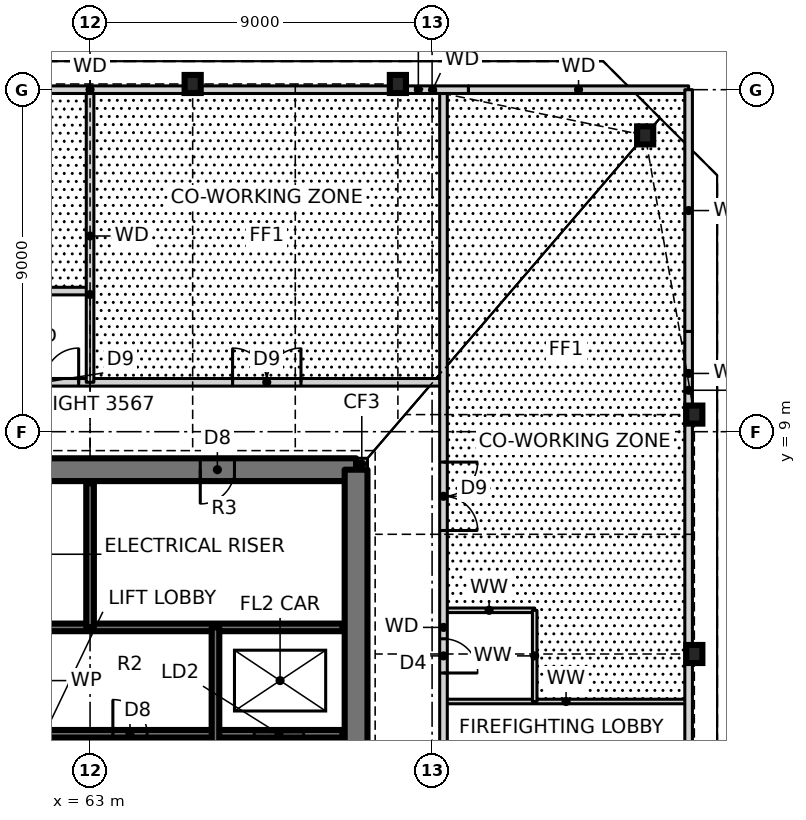
"""IFC4 building model, lengths in metres.
Left out: names, types, materials, properties, quantities, classifications, styles, units other than length and angle.
Written with IfcOpenShell. Run it as: python <this file> out.ifc"""

import sys

from ifc_helpers import new_model, si_unit, direction, frame, frame_2d, origin, origin_2d, place, context, subcontext, project, spatial, rectangle, i_section, extrude, element, fill, save


model = new_model("IFC4")
c1 = context("Model", 3, precision=1e-05, world=origin(), true_north=direction((0.0, 1.0)))
c2 = subcontext(c1, "Body", "Model", "MODEL_VIEW")
j1 = project(units=[si_unit("LENGTHUNIT", "METRE"), si_unit("PLANEANGLEUNIT", "RADIAN")], contexts=[c1])
p1 = place(None, origin())
s1 = spatial("IfcSite", under=j1, at=p1, CompositionType="ELEMENT")
p2 = place(p1, origin())
s2 = spatial("IfcBuilding", under=s1, at=p2, CompositionType="ELEMENT")
p3 = place(p2, frame((0.0, 0.0, 6.0)))
s3 = spatial("IfcBuildingStorey", under=s2, at=p3, CompositionType="ELEMENT", Elevation=6.0)
for number, where, z_axis, x_axis in (
    (1, (78.9, 3.15, 0.0), (0.0, 0.0, 1.0), (1.0, 0.0, 0.0)),
    (2, (78.9, 9.45, 0.0), (0.0, 0.0, 1.0), (1.0, 0.0, 0.0)),
    (3, (77.606, 16.797, 0.0), (0.0, 0.0, 1.0), (1.0, 0.0, 0.0)),
    (4, (71.1, 18.15, 0.0), (0.0, 0.0, 1.0), (1.0, 0.0, 0.0)),
    (5, (65.7, 18.15, 0.0), (0.0, 0.0, 1.0), (1.0, 0.0, 0.0)),
):
    element("IfcColumn", number, at=place(p3, frame(where, z_axis=z_axis, x_axis=x_axis)), inside=s3, PredefinedType="COLUMN", context=c2, shape_type="SweptSolid", body=[
        extrude(i_section(OverallWidth=0.424, OverallDepth=0.475, WebThickness=0.048, FlangeThickness=0.077, at=origin_2d()), origin(), (0.0, 0.0, 1.0), 4.5),
    ])
p4 = place(p3, frame((70.0, 8.15, 0.0), z_axis=(0.0, 0.0, 1.0), x_axis=(1.0, 0.0, 0.0)))
e6 = element("IfcWall", 6, at=p4, inside=s3, PredefinedType="SOLIDWALL", context=c2, shape_type="SweptSolid", body=[
    extrude(rectangle(XDim=0.3, YDim=0.3, at=frame_2d((0.15, 0.0))), origin(), (0.0, 0.0, 1.0), 4.5),
])
p5 = place(p3, frame((70.0, 8.0, 0.0), z_axis=(0.0, 0.0, 1.0), x_axis=(-1.0, 0.0, 0.0)))
e7 = element("IfcWall", 7, at=p5, inside=s3, PredefinedType="SHEAR", context=c2, shape_type="SweptSolid", body=[
    extrude(rectangle(XDim=14.0, YDim=0.6, at=frame_2d((7.0, 0.0))), origin(), (0.0, 0.0, 1.0), 4.5),
])
p6 = place(p5, frame((8.2, 0.0, 0.0)))
e8 = element("IfcOpeningElement", 8, at=p6, cuts=e7, PredefinedType="OPENING", context=c2, shape_type="SweptSolid", body=[
    extrude(rectangle(XDim=0.9, YDim=2.1, at=frame_2d((0.45, 1.05))), frame((0.0, 0.31, 0.0), z_axis=(0.0, -1.0, 0.0), x_axis=(1.0, 0.0, 0.0)), (0.0, 0.0, 1.0), 0.62),
])
p7 = place(p5, frame((3.2, 0.0, 0.0)))
e9 = element("IfcOpeningElement", 9, at=p7, cuts=e7, PredefinedType="OPENING", context=c2, shape_type="SweptSolid", body=[
    extrude(rectangle(XDim=0.9, YDim=2.1, at=frame_2d((0.45, 1.05))), frame((0.0, 0.31, 0.0), z_axis=(0.0, -1.0, 0.0), x_axis=(1.0, 0.0, 0.0)), (0.0, 0.0, 1.0), 0.62),
])
p8 = place(p3, frame((70.0, -8.0, 0.0), z_axis=(0.0, 0.0, 1.0), x_axis=(0.0, 1.0, 0.0)))
e10 = element("IfcWall", 10, at=p8, inside=s3, PredefinedType="SHEAR", context=c2, shape_type="SweptSolid", body=[
    extrude(rectangle(XDim=16.0, YDim=0.6, at=frame_2d((8.0, 0.0))), origin(), (0.0, 0.0, 1.0), 4.5),
])
p9 = place(p8, frame((7.5, 0.0, 0.0)))
e11 = element("IfcOpeningElement", 11, at=p9, cuts=e10, PredefinedType="OPENING", context=c2, shape_type="SweptSolid", body=[
    extrude(rectangle(XDim=1.0, YDim=2.1, at=frame_2d((0.5, 1.05))), frame((0.0, 0.31, 0.0), z_axis=(0.0, -1.0, 0.0), x_axis=(1.0, 0.0, 0.0)), (0.0, 0.0, 1.0), 0.62),
])
p10 = place(p3, frame((56.36, 1.05, 0.0), z_axis=(0.0, 0.0, 1.0), x_axis=(1.0, 0.0, 0.0)))
e12 = element("IfcWall", 12, at=p10, inside=s3, PredefinedType="SOLIDWALL", context=c2, shape_type="SweptSolid", body=[
    extrude(rectangle(XDim=13.28, YDim=0.2, at=frame_2d((6.64, 0.0))), origin(), (0.0, 0.0, 1.0), 4.5),
])
p11 = place(p10, frame((1.17, 0.0, 0.0)))
e13 = element("IfcOpeningElement", 13, at=p11, cuts=e12, PredefinedType="OPENING", context=c2, shape_type="SweptSolid", body=[
    extrude(rectangle(XDim=1.0, YDim=2.1, at=frame_2d((0.5, 1.05))), frame((0.0, 0.11, 0.0), z_axis=(0.0, -1.0, 0.0), x_axis=(1.0, 0.0, 0.0)), (0.0, 0.0, 1.0), 0.22),
])
p12 = place(p10, frame((7.24, 0.0, 0.0)))
e14 = element("IfcOpeningElement", 14, at=p12, cuts=e12, PredefinedType="OPENING", context=c2, shape_type="SweptSolid", body=[
    extrude(rectangle(XDim=0.9, YDim=2.1, at=frame_2d((0.45, 1.05))), frame((0.0, 0.11, 0.0), z_axis=(0.0, -1.0, 0.0), x_axis=(1.0, 0.0, 0.0)), (0.0, 0.0, 1.0), 0.22),
])
p13 = place(p10, frame((3.94, 0.0, 0.0)))
e15 = element("IfcOpeningElement", 15, at=p13, cuts=e12, PredefinedType="OPENING", context=c2, shape_type="SweptSolid", body=[
    extrude(rectangle(XDim=0.9, YDim=2.1, at=frame_2d((0.45, 1.05))), frame((0.0, 0.11, 0.0), z_axis=(0.0, -1.0, 0.0), x_axis=(1.0, 0.0, 0.0)), (0.0, 0.0, 1.0), 0.22),
])
p14 = place(p10, frame((10.96, 0.0, 0.0)))
e16 = element("IfcOpeningElement", 16, at=p14, cuts=e12, PredefinedType="OPENING", context=c2, shape_type="SweptSolid", body=[
    extrude(rectangle(XDim=1.3, YDim=2.1, at=frame_2d((0.65, 1.05))), frame((0.0, 0.11, 0.0), z_axis=(0.0, -1.0, 0.0), x_axis=(1.0, 0.0, 0.0)), (0.0, 0.0, 1.0), 0.22),
])
p15 = place(p3, frame((72.3, 1.9, 0.0), z_axis=(0.0, 0.0, 1.0), x_axis=(1.0, 0.0, 0.0)))
e17 = element("IfcWall", 17, at=p15, inside=s3, PredefinedType="PARTITIONING", context=c2, shape_type="SweptSolid", body=[
    extrude(rectangle(XDim=6.45, YDim=0.12, at=frame_2d((3.225, 0.0))), origin(), (0.0, 0.0, 1.0), 4.25),
])
p16 = place(p3, frame((59.7, 3.85, 0.0), z_axis=(0.0, 0.0, 1.0), x_axis=(1.0, 0.0, 0.0)))
e18 = element("IfcWall", 18, at=p16, inside=s3, PredefinedType="SOLIDWALL", context=c2, shape_type="SweptSolid", body=[
    extrude(rectangle(XDim=9.94, YDim=0.2, at=frame_2d((4.97, 0.0))), origin(), (0.0, 0.0, 1.0), 4.5),
])
p17 = place(p3, frame((72.3, 4.3, 0.0), z_axis=(0.0, 0.0, 1.0), x_axis=(1.0, 0.0, 0.0)))
e19 = element("IfcWall", 19, at=p17, inside=s3, PredefinedType="PARTITIONING", context=c2, shape_type="SweptSolid", body=[
    extrude(rectangle(XDim=2.4, YDim=0.12, at=frame_2d((1.2, 0.0))), origin(), (0.0, 0.0, 1.0), 4.25),
])
p18 = place(p3, frame((47.25, 10.3, 0.0), z_axis=(0.0, 0.0, 1.0), x_axis=(1.0, 0.0, 0.0)))
e20 = element("IfcWall", 20, at=p18, inside=s3, PredefinedType="SOLIDWALL", context=c2, shape_type="SweptSolid", body=[
    extrude(rectangle(XDim=25.05, YDim=0.2, at=frame_2d((12.525, 0.0))), origin(), (0.0, 0.0, 1.0), 4.25),
])
p19 = place(p18, frame((19.5, 0.0, 0.0)))
e21 = element("IfcOpeningElement", 21, at=p19, cuts=e20, PredefinedType="OPENING", context=c2, shape_type="SweptSolid", body=[
    extrude(rectangle(XDim=1.8, YDim=2.1, at=frame_2d((0.9, 1.05))), frame((0.0, 0.11, 0.0), z_axis=(0.0, -1.0, 0.0), x_axis=(1.0, 0.0, 0.0)), (0.0, 0.0, 1.0), 0.22),
])
p20 = place(p18, frame((13.65, 0.0, 0.0)))
e22 = element("IfcOpeningElement", 22, at=p20, cuts=e20, PredefinedType="OPENING", context=c2, shape_type="SweptSolid", body=[
    extrude(rectangle(XDim=1.8, YDim=2.1, at=frame_2d((0.9, 1.05))), frame((0.0, 0.11, 0.0), z_axis=(0.0, -1.0, 0.0), x_axis=(1.0, 0.0, 0.0)), (0.0, 0.0, 1.0), 0.22),
])
p21 = place(p18, frame((11.25, 0.0, 0.0)))
e23 = element("IfcOpeningElement", 23, at=p21, cuts=e20, PredefinedType="OPENING", context=c2, shape_type="SweptSolid", body=[
    extrude(rectangle(XDim=1.8, YDim=2.1, at=frame_2d((0.9, 1.05))), frame((0.0, 0.11, 0.0), z_axis=(0.0, -1.0, 0.0), x_axis=(1.0, 0.0, 0.0)), (0.0, 0.0, 1.0), 0.22),
])
p22 = place(p18, frame((7.8, 0.0, 0.0)))
e24 = element("IfcOpeningElement", 24, at=p22, cuts=e20, PredefinedType="OPENING", context=c2, shape_type="SweptSolid", body=[
    extrude(rectangle(XDim=1.8, YDim=2.1, at=frame_2d((0.9, 1.05))), frame((0.0, 0.11, 0.0), z_axis=(0.0, -1.0, 0.0), x_axis=(1.0, 0.0, 0.0)), (0.0, 0.0, 1.0), 0.22),
])
p23 = place(p3, frame((58.2, 12.7, 0.0), z_axis=(0.0, 0.0, 1.0), x_axis=(1.0, 0.0, 0.0)))
e25 = element("IfcWall", 25, at=p23, inside=s3, PredefinedType="SOLIDWALL", context=c2, shape_type="SweptSolid", body=[
    extrude(rectangle(XDim=4.8, YDim=0.2, at=frame_2d((2.4, 0.0))), origin(), (0.0, 0.0, 1.0), 4.25),
])
p24 = place(p3, frame((74.7, 1.9, 0.0), z_axis=(0.0, 0.0, 1.0), x_axis=(0.0, 1.0, 0.0)))
e26 = element("IfcWall", 26, at=p24, inside=s3, PredefinedType="PARTITIONING", context=c2, shape_type="SweptSolid", body=[
    extrude(rectangle(XDim=2.4, YDim=0.12, at=frame_2d((1.2, 0.0))), origin(), (0.0, 0.0, 1.0), 4.25),
])
p25 = place(p3, frame((72.3, -10.3, 0.0), z_axis=(0.0, 0.0, 1.0), x_axis=(0.0, 1.0, 0.0)))
e27 = element("IfcWall", 27, at=p25, inside=s3, PredefinedType="SOLIDWALL", context=c2, shape_type="SweptSolid", body=[
    extrude(rectangle(XDim=28.3, YDim=0.2, at=frame_2d((14.15, 0.0))), origin(), (0.0, 0.0, 1.0), 4.25),
])
p26 = place(p25, frame((1.6, 0.0, 0.0)))
e28 = element("IfcOpeningElement", 28, at=p26, cuts=e27, PredefinedType="OPENING", context=c2, shape_type="SweptSolid", body=[
    extrude(rectangle(XDim=1.8, YDim=2.1, at=frame_2d((0.9, 1.05))), frame((0.0, 0.11, 0.0), z_axis=(0.0, -1.0, 0.0), x_axis=(1.0, 0.0, 0.0)), (0.0, 0.0, 1.0), 0.22),
])
p27 = place(p25, frame((6.35, 0.0, 0.0)))
e29 = element("IfcOpeningElement", 29, at=p27, cuts=e27, PredefinedType="OPENING", context=c2, shape_type="SweptSolid", body=[
    extrude(rectangle(XDim=0.9, YDim=2.1, at=frame_2d((0.45, 1.05))), frame((0.0, 0.11, 0.0), z_axis=(0.0, -1.0, 0.0), x_axis=(1.0, 0.0, 0.0)), (0.0, 0.0, 1.0), 0.22),
])
p28 = place(p25, frame((9.95, 0.0, 0.0)))
e30 = element("IfcOpeningElement", 30, at=p28, cuts=e27, PredefinedType="OPENING", context=c2, shape_type="SweptSolid", body=[
    extrude(rectangle(XDim=0.9, YDim=2.1, at=frame_2d((0.45, 1.05))), frame((0.0, 0.11, 0.0), z_axis=(0.0, -1.0, 0.0), x_axis=(1.0, 0.0, 0.0)), (0.0, 0.0, 1.0), 0.22),
])
p29 = place(p25, frame((12.95, 0.0, 0.0)))
e31 = element("IfcOpeningElement", 31, at=p29, cuts=e27, PredefinedType="OPENING", context=c2, shape_type="SweptSolid", body=[
    extrude(rectangle(XDim=0.9, YDim=2.1, at=frame_2d((0.45, 1.05))), frame((0.0, 0.11, 0.0), z_axis=(0.0, -1.0, 0.0), x_axis=(1.0, 0.0, 0.0)), (0.0, 0.0, 1.0), 0.22),
])
p30 = place(p25, frame((16.7, 0.0, 0.0)))
e32 = element("IfcOpeningElement", 32, at=p30, cuts=e27, PredefinedType="OPENING", context=c2, shape_type="SweptSolid", body=[
    extrude(rectangle(XDim=1.8, YDim=2.1, at=frame_2d((0.9, 1.05))), frame((0.0, 0.11, 0.0), z_axis=(0.0, -1.0, 0.0), x_axis=(1.0, 0.0, 0.0)), (0.0, 0.0, 1.0), 0.22),
])
p31 = place(p3, frame((66.3, -7.64, 0.0), z_axis=(0.0, 0.0, 1.0), x_axis=(0.0, 1.0, 0.0)))
e33 = element("IfcWall", 33, at=p31, inside=s3, PredefinedType="SOLIDWALL", context=c2, shape_type="SweptSolid", body=[
    extrude(rectangle(XDim=11.49, YDim=0.2, at=frame_2d((5.745, 0.0))), origin(), (0.0, 0.0, 1.0), 4.5),
])
p32 = place(p31, frame((7.04, 0.0, 0.0)))
e34 = element("IfcOpeningElement", 34, at=p32, cuts=e33, PredefinedType="OPENING", context=c2, shape_type="SweptSolid", body=[
    extrude(rectangle(XDim=1.2, YDim=2.1, at=frame_2d((0.6, 1.05))), frame((0.0, 0.11, 0.0), z_axis=(0.0, -1.0, 0.0), x_axis=(1.0, 0.0, 0.0)), (0.0, 0.0, 1.0), 0.22),
])
p33 = place(p3, frame((63.0, 3.85, 0.0), z_axis=(0.0, 0.0, 1.0), x_axis=(0.0, 1.0, 0.0)))
e35 = element("IfcWall", 35, at=p33, inside=s3, PredefinedType="SOLIDWALL", context=c2, shape_type="SweptSolid", body=[
    extrude(rectangle(XDim=3.79, YDim=0.2, at=frame_2d((1.895, 0.0))), origin(), (0.0, 0.0, 1.0), 4.5),
])
p34 = place(p3, frame((63.0, 10.3, 0.0), z_axis=(0.0, 0.0, 1.0), x_axis=(0.0, 1.0, 0.0)))
e36 = element("IfcWall", 36, at=p34, inside=s3, PredefinedType="SOLIDWALL", context=c2, shape_type="SweptSolid", body=[
    extrude(rectangle(XDim=7.7, YDim=0.2, at=frame_2d((3.85, 0.0))), origin(), (0.0, 0.0, 1.0), 3.567),
])
p35 = place(p3, frame((54.927, 18.0, 0.0), z_axis=(0.0, 0.0, 1.0), x_axis=(1.0, 0.0, 0.0)))
e37 = element("IfcWall", 37, at=p35, inside=s3, PredefinedType="SOLIDWALL", context=c2, shape_type="SweptSolid", body=[
    extrude(rectangle(XDim=16.146, YDim=0.2, at=frame_2d((8.073, 0.0))), origin(), (0.0, 0.0, 1.0), 4.25),
])
p36 = place(p3, frame((71.073, 18.0, 0.0), z_axis=(0.0, 0.0, 1.0), x_axis=(1.0, 0.0, 0.0)))
e38 = element("IfcWall", 38, at=p36, inside=s3, PredefinedType="SOLIDWALL", context=c2, shape_type="SweptSolid", body=[
    extrude(rectangle(XDim=1.884, YDim=0.2, at=frame_2d((0.942, 0.0))), origin(), (0.0, 0.0, 1.0), 3.488),
])
p37 = place(p3, frame((72.957, 18.0, 0.0), z_axis=(0.0, 0.0, 1.0), x_axis=(1.0, 0.0, 0.0)))
e39 = element("IfcWall", 39, at=p37, inside=s3, PredefinedType="SOLIDWALL", context=c2, shape_type="SweptSolid", body=[
    extrude(rectangle(XDim=5.793, YDim=0.2, at=frame_2d((2.896, 0.0))), origin(), (0.0, 0.0, 1.0), 4.25),
])
p38 = place(p3, frame((78.75, -9.427, 0.0), z_axis=(0.0, 0.0, 1.0), x_axis=(0.0, 1.0, 0.0)))
e40 = element("IfcWall", 40, at=p38, inside=s3, PredefinedType="SOLIDWALL", context=c2, shape_type="SweptSolid", body=[
    extrude(rectangle(XDim=18.854, YDim=0.2, at=frame_2d((9.427, 0.0))), origin(), (0.0, 0.0, 1.0), 4.25),
])
p39 = place(p3, frame((78.75, 9.427, 0.0), z_axis=(0.0, 0.0, 1.0), x_axis=(0.0, 1.0, 0.0)))
e41 = element("IfcWall", 41, at=p39, inside=s3, PredefinedType="SOLIDWALL", context=c2, shape_type="SweptSolid", body=[
    extrude(rectangle(XDim=2.212, YDim=0.2, at=frame_2d((1.106, 0.0))), origin(), (0.0, 0.0, 1.0), 3.488),
])
p40 = place(p3, frame((78.75, 11.639, 0.0), z_axis=(0.0, 0.0, 1.0), x_axis=(0.0, 1.0, 0.0)))
e42 = element("IfcWall", 42, at=p40, inside=s3, PredefinedType="SOLIDWALL", context=c2, shape_type="SweptSolid", body=[
    extrude(rectangle(XDim=6.361, YDim=0.2, at=frame_2d((3.181, 0.0))), origin(), (0.0, 0.0, 1.0), 4.25),
])
p41 = place(p12, origin())
e43 = element("IfcDoor", 43, at=p41, inside=s3, OperationType="SINGLE_SWING_LEFT", PredefinedType="DOOR", context=c2, shape_type="SweptSolid", body=[
    extrude(rectangle(XDim=0.9, YDim=2.1, at=frame_2d((0.45, 1.05))), frame((0.0, 0.025, 0.0), z_axis=(0.0, -1.0, 0.0), x_axis=(1.0, 0.0, 0.0)), (0.0, 0.0, 1.0), 0.05),
])
fill(e14, e43)
p42 = place(p29, frame((0.9, 0.0, 0.0), z_axis=(0.0, 0.0, 1.0), x_axis=(-1.0, 0.0, 0.0)))
e44 = element("IfcDoor", 44, at=p42, inside=s3, OperationType="SINGLE_SWING_RIGHT", PredefinedType="DOOR", context=c2, shape_type="SweptSolid", body=[
    extrude(rectangle(XDim=0.9, YDim=2.1, at=frame_2d((0.45, 1.05))), frame((0.0, 0.025, 0.0), z_axis=(0.0, -1.0, 0.0), x_axis=(1.0, 0.0, 0.0)), (0.0, 0.0, 1.0), 0.05),
])
fill(e31, e44)
p43 = place(p30, frame((1.8, 0.0, 0.0), z_axis=(0.0, 0.0, 1.0), x_axis=(-1.0, 0.0, 0.0)))
e45 = element("IfcDoor", 45, at=p43, inside=s3, OperationType="DOUBLE_DOOR_SINGLE_SWING", PredefinedType="DOOR", context=c2, shape_type="SweptSolid", body=[
    extrude(rectangle(XDim=1.8, YDim=2.1, at=frame_2d((0.9, 1.05))), frame((0.0, 0.025, 0.0), z_axis=(0.0, -1.0, 0.0), x_axis=(1.0, 0.0, 0.0)), (0.0, 0.0, 1.0), 0.05),
])
fill(e32, e45)
p44 = place(p19, origin())
e46 = element("IfcDoor", 46, at=p44, inside=s3, OperationType="DOUBLE_DOOR_SINGLE_SWING", PredefinedType="DOOR", context=c2, shape_type="SweptSolid", body=[
    extrude(rectangle(XDim=1.8, YDim=2.1, at=frame_2d((0.9, 1.05))), frame((0.0, 0.025, 0.0), z_axis=(0.0, -1.0, 0.0), x_axis=(1.0, 0.0, 0.0)), (0.0, 0.0, 1.0), 0.05),
])
fill(e21, e46)
p45 = place(p20, origin())
e47 = element("IfcDoor", 47, at=p45, inside=s3, OperationType="DOUBLE_DOOR_SINGLE_SWING", PredefinedType="DOOR", context=c2, shape_type="SweptSolid", body=[
    extrude(rectangle(XDim=1.8, YDim=2.1, at=frame_2d((0.9, 1.05))), frame((0.0, 0.025, 0.0), z_axis=(0.0, -1.0, 0.0), x_axis=(1.0, 0.0, 0.0)), (0.0, 0.0, 1.0), 0.05),
])
fill(e22, e47)
p46 = place(p7, origin())
e48 = element("IfcDoor", 48, at=p46, inside=s3, OperationType="SINGLE_SWING_RIGHT", PredefinedType="DOOR", context=c2, shape_type="SweptSolid", body=[
    extrude(rectangle(XDim=0.9, YDim=2.1, at=frame_2d((0.45, 1.05))), frame((0.0, 0.025, 0.0), z_axis=(0.0, -1.0, 0.0), x_axis=(1.0, 0.0, 0.0)), (0.0, 0.0, 1.0), 0.05),
])
fill(e9, e48)
p47 = place(p14, origin())
e49 = element("IfcDoor", 49, at=p47, inside=s3, OperationType="SLIDING_TO_LEFT", PredefinedType="DOOR", context=c2, shape_type="SweptSolid", body=[
    extrude(rectangle(XDim=1.3, YDim=2.1, at=frame_2d((0.65, 1.05))), frame((0.0, 0.025, 0.0), z_axis=(0.0, -1.0, 0.0), x_axis=(1.0, 0.0, 0.0)), (0.0, 0.0, 1.0), 0.05),
])
fill(e16, e49)
save(model, sys.argv[1])
